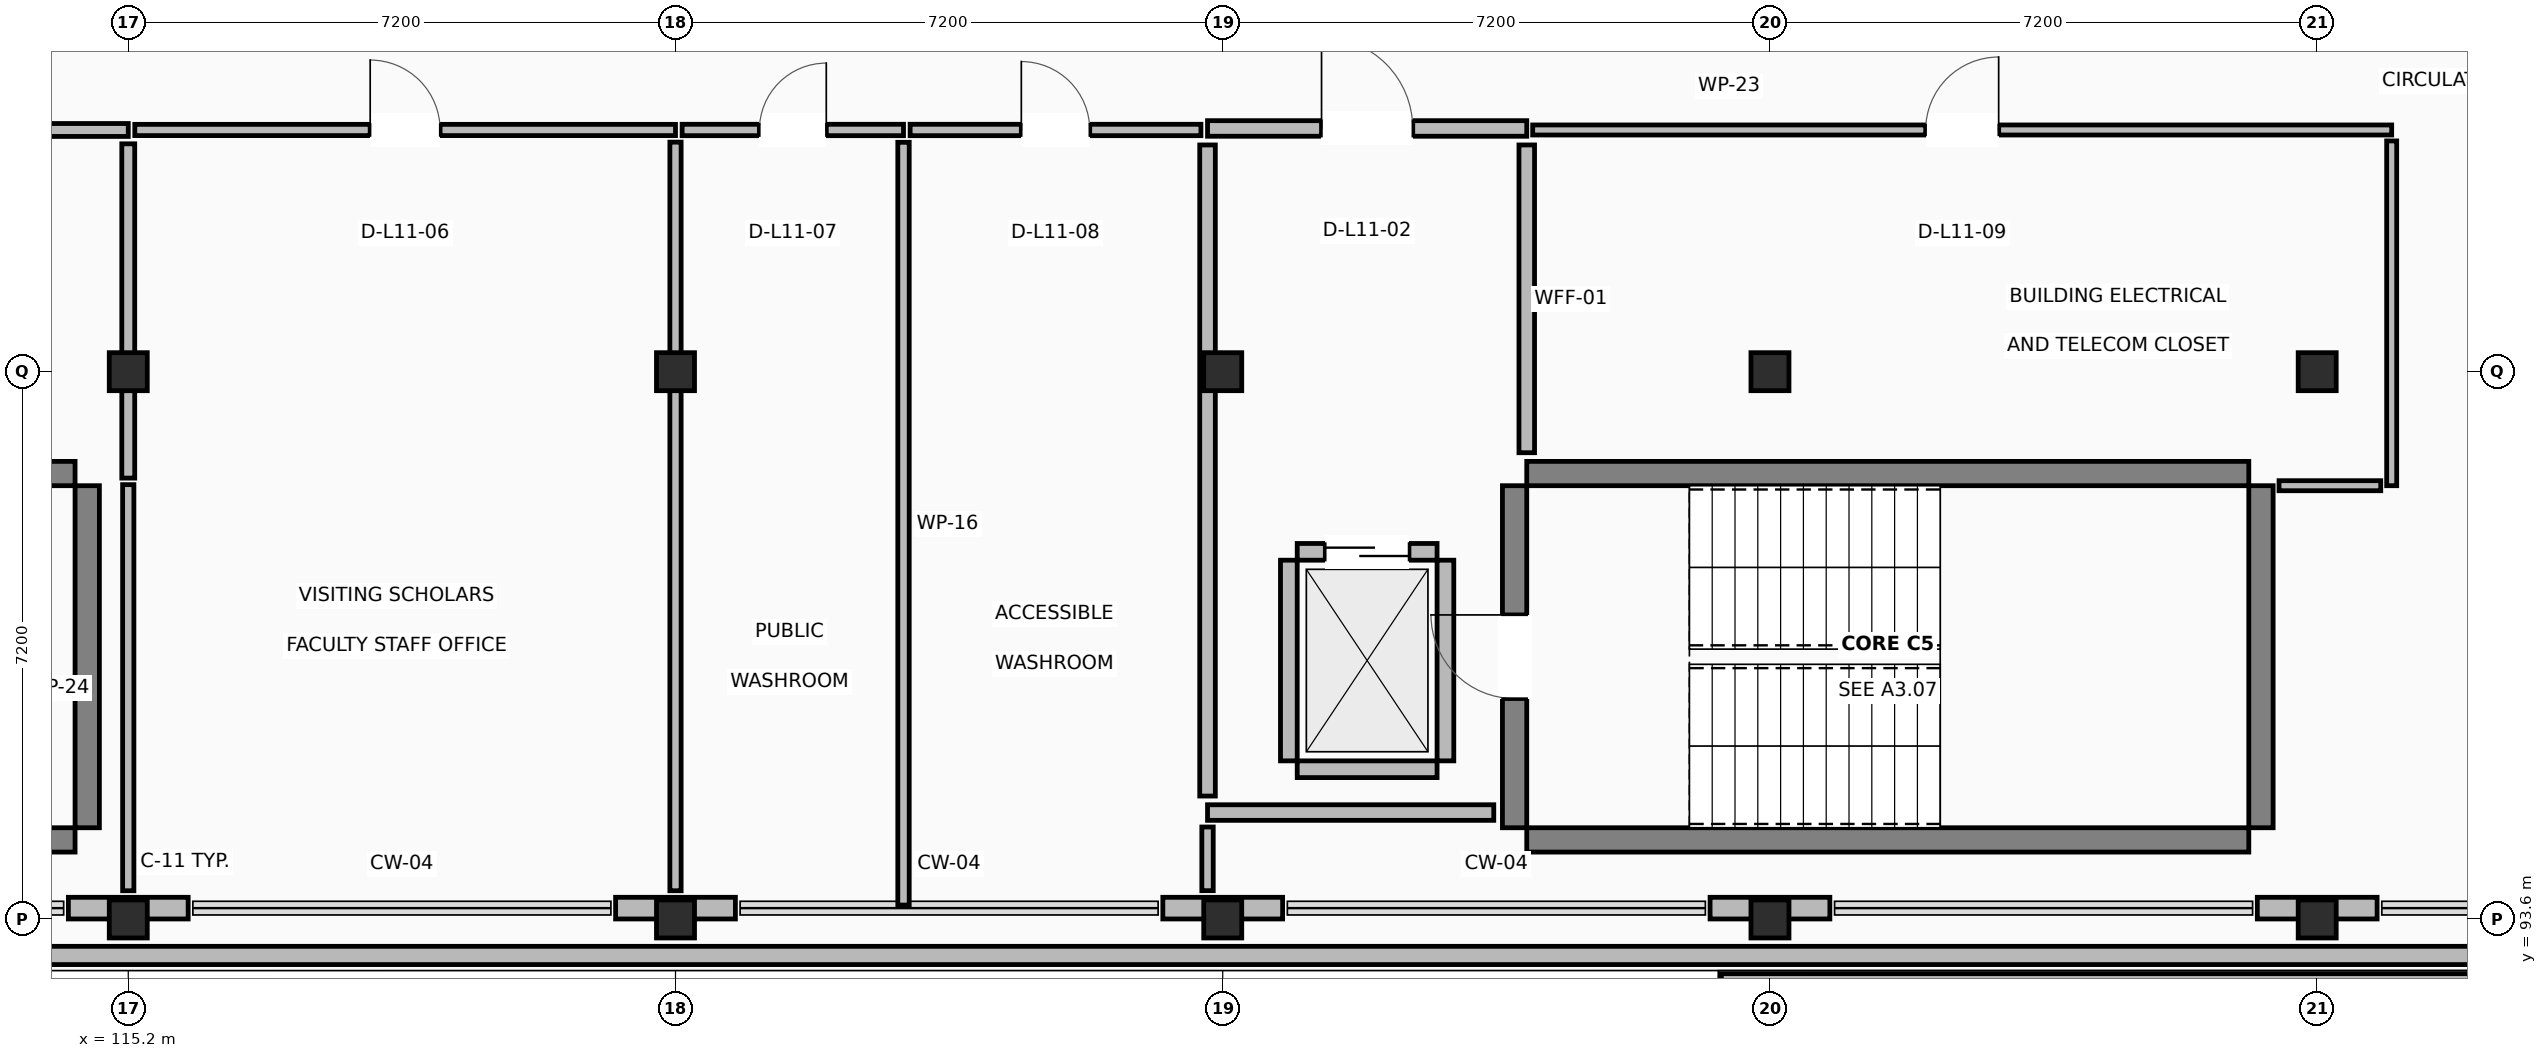
"""IFC4 building model, lengths in metres.
Left out: names, types, materials, properties, quantities, classifications, styles, units other than length and angle.
Written with IfcOpenShell. Run it as: python <this file> out.ifc"""

import sys

from ifc_helpers import new_model, si_unit, direction, frame, frame_2d, origin, origin_2d, place, context, subcontext, project, spatial, rectangle, extrude, element, fill, save


model = new_model("IFC4")
c1 = context("Model", 3, precision=1e-05, world=origin(), true_north=direction((0.0, 1.0)))
c2 = subcontext(c1, "Body", "Model", "MODEL_VIEW")
j1 = project(units=[si_unit("LENGTHUNIT", "METRE"), si_unit("PLANEANGLEUNIT", "RADIAN")], contexts=[c1])
p1 = place(None, origin())
s1 = spatial("IfcSite", under=j1, at=p1, CompositionType="ELEMENT")
p2 = place(p1, origin())
s2 = spatial("IfcBuilding", under=s1, at=p2, CompositionType="ELEMENT")
p3 = place(p2, frame((0.0, 0.0, 48.0)))
s3 = spatial("IfcBuildingStorey", under=s2, at=p3, CompositionType="ELEMENT", Elevation=48.0)
for number, where, z_axis, x_axis in (
    (1, (115.2, 93.6, 0.0), (0.0, 0.0, 1.0), (1.0, 0.0, 0.0)),
    (2, (115.2, 100.8, 0.0), (0.0, 0.0, 1.0), (1.0, 0.0, 0.0)),
    (3, (122.4, 93.6, 0.0), (0.0, 0.0, 1.0), (1.0, 0.0, 0.0)),
    (4, (122.4, 100.8, 0.0), (0.0, 0.0, 1.0), (1.0, 0.0, 0.0)),
    (5, (129.6, 93.6, 0.0), (0.0, 0.0, 1.0), (1.0, 0.0, 0.0)),
    (6, (129.6, 100.8, 0.0), (0.0, 0.0, 1.0), (1.0, 0.0, 0.0)),
    (7, (136.8, 93.6, 0.0), (0.0, 0.0, 1.0), (1.0, 0.0, 0.0)),
    (8, (136.8, 100.8, 0.0), (0.0, 0.0, 1.0), (1.0, 0.0, 0.0)),
    (9, (144.0, 93.6, 0.0), (0.0, 0.0, 1.0), (1.0, 0.0, 0.0)),
    (10, (144.0, 100.8, 0.0), (0.0, 0.0, 1.0), (1.0, 0.0, 0.0)),
):
    element("IfcColumn", number, at=place(p3, frame(where, z_axis=z_axis, x_axis=x_axis)), inside=s3, PredefinedType="COLUMN", context=c2, shape_type="SweptSolid", body=[
        extrude(rectangle(XDim=0.5, YDim=0.5, at=origin_2d()), origin(), (0.0, 0.0, 1.0), 3.92),
    ])
for number, where, z_axis, x_axis in (
    (11, (105.0, 94.64, 0.0), (0.0, 0.0, 1.0), (1.0, 0.0, 0.0)),
    (12, (105.0, 99.46, 0.0), (0.0, 0.0, 1.0), (1.0, 0.0, 0.0)),
):
    element("IfcWall", number, at=place(p3, frame(where, z_axis=z_axis, x_axis=x_axis)), inside=s3, PredefinedType="SHEAR", context=c2, shape_type="SweptSolid", body=[
        extrude(rectangle(XDim=9.5, YDim=0.32, at=frame_2d((4.75, 0.0))), origin(), (0.0, 0.0, 1.0), 3.92),
    ])
p4 = place(p3, frame((114.66, 94.8, 0.0), z_axis=(0.0, 0.0, 1.0), x_axis=(0.0, 1.0, 0.0)))
e13 = element("IfcWall", 13, at=p4, inside=s3, PredefinedType="SHEAR", context=c2, shape_type="SweptSolid", body=[
    extrude(rectangle(XDim=4.5, YDim=0.32, at=frame_2d((2.25, 0.0))), origin(), (0.0, 0.0, 1.0), 3.92),
])
for number, where, z_axis, x_axis in (
    (14, (133.6, 94.64, 0.0), (0.0, 0.0, 1.0), (1.0, 0.0, 0.0)),
    (15, (133.6, 99.46, 0.0), (0.0, 0.0, 1.0), (1.0, 0.0, 0.0)),
):
    element("IfcWall", number, at=place(p3, frame(where, z_axis=z_axis, x_axis=x_axis)), inside=s3, PredefinedType="SHEAR", context=c2, shape_type="SweptSolid", body=[
        extrude(rectangle(XDim=9.5, YDim=0.32, at=frame_2d((4.75, 0.0))), origin(), (0.0, 0.0, 1.0), 3.92),
    ])
p5 = place(p3, frame((133.44, 94.8, 0.0), z_axis=(0.0, 0.0, 1.0), x_axis=(0.0, 1.0, 0.0)))
e16 = element("IfcWall", 16, at=p5, inside=s3, PredefinedType="SHEAR", context=c2, shape_type="SweptSolid", body=[
    extrude(rectangle(XDim=4.5, YDim=0.32, at=frame_2d((2.25, 0.0))), origin(), (0.0, 0.0, 1.0), 3.92),
])
p6 = place(p5, frame((1.7, 0.0, 0.0)))
e17 = element("IfcOpeningElement", 17, at=p6, cuts=e16, PredefinedType="OPENING", context=c2, shape_type="SweptSolid", body=[
    extrude(rectangle(XDim=1.1, YDim=2.15, at=frame_2d((0.55, 1.075))), frame((0.0, 0.17, 0.0), z_axis=(0.0, -1.0, 0.0), x_axis=(1.0, 0.0, 0.0)), (0.0, 0.0, 1.0), 0.34),
])
p7 = place(p3, frame((143.26, 94.8, 0.0), z_axis=(0.0, 0.0, 1.0), x_axis=(0.0, 1.0, 0.0)))
e18 = element("IfcWall", 18, at=p7, inside=s3, PredefinedType="SHEAR", context=c2, shape_type="SweptSolid", body=[
    extrude(rectangle(XDim=4.5, YDim=0.32, at=frame_2d((2.25, 0.0))), origin(), (0.0, 0.0, 1.0), 3.92),
])
for number, where, z_axis, x_axis in (
    (19, (114.412, 93.742, 0.0), (0.0, 0.0, 1.0), (1.0, 0.0, 0.0)),
    (20, (121.612, 93.742, 0.0), (0.0, 0.0, 1.0), (1.0, 0.0, 0.0)),
    (21, (128.812, 93.742, 0.0), (0.0, 0.0, 1.0), (1.0, 0.0, 0.0)),
    (22, (136.012, 93.742, 0.0), (0.0, 0.0, 1.0), (1.0, 0.0, 0.0)),
):
    element("IfcWall", number, at=place(p3, frame(where, z_axis=z_axis, x_axis=x_axis)), inside=s3, PredefinedType="STANDARD", context=c2, shape_type="SweptSolid", body=[
        extrude(rectangle(XDim=1.576, YDim=0.285, at=frame_2d((0.788, 0.0))), origin(), (0.0, 0.0, 1.0), 2.96),
    ])
p8 = place(p3, frame((143.212, 93.742, 0.0), z_axis=(0.0, 0.0, 1.0), x_axis=(1.0, 0.0, 0.0)))
e23 = element("IfcWall", 23, at=p8, inside=s3, PredefinedType="STANDARD", context=c2, shape_type="SweptSolid", body=[
    extrude(rectangle(XDim=1.576, YDim=0.285, at=frame_2d((0.788, 0.0))), origin(), (0.0, 0.0, 1.0), 2.96),
])
p9 = place(p3, frame((151.8, 93.12, 0.0), z_axis=(0.0, 0.0, 1.0), x_axis=(-1.0, 0.0, 0.0)))
e24 = element("IfcWall", 24, at=p9, inside=s3, PredefinedType="PARAPET", context=c2, shape_type="SweptSolid", body=[
    extrude(rectangle(XDim=50.44, YDim=0.24, at=frame_2d((25.22, 0.0))), origin(), (0.0, 0.0, 1.0), 1.12),
])
p10 = place(p3, frame((136.16, 92.77, 0.0), z_axis=(0.0, 0.0, 1.0), x_axis=(1.0, 0.0, 0.0)))
e25 = element("IfcWall", 25, at=p10, inside=s3, PredefinedType="PARAPET", context=c2, shape_type="SweptSolid", body=[
    extrude(rectangle(XDim=15.68, YDim=0.22, at=frame_2d((7.84, 0.0))), origin(), (0.0, 0.0, 1.0), 1.12),
])
p11 = place(p3, frame((130.58, 95.57, 0.0), z_axis=(0.0, 0.0, 1.0), x_axis=(1.0, 0.0, 0.0)))
e26 = element("IfcWall", 26, at=p11, inside=s3, PredefinedType="STANDARD", context=c2, shape_type="SweptSolid", body=[
    extrude(rectangle(XDim=1.84, YDim=0.22, at=frame_2d((0.92, 0.0))), origin(), (0.0, 0.0, 1.0), 2.96),
])
p12 = place(p3, frame((130.58, 98.43, 0.0), z_axis=(0.0, 0.0, 1.0), x_axis=(1.0, 0.0, 0.0)))
e27 = element("IfcWall", 27, at=p12, inside=s3, PredefinedType="STANDARD", context=c2, shape_type="SweptSolid", body=[
    extrude(rectangle(XDim=1.84, YDim=0.22, at=frame_2d((0.92, 0.0))), origin(), (0.0, 0.0, 1.0), 2.96),
])
p13 = place(p12, frame((0.37, 0.0, 0.0)))
e28 = element("IfcOpeningElement", 28, at=p13, cuts=e27, PredefinedType="OPENING", context=c2, shape_type="SweptSolid", body=[
    extrude(rectangle(XDim=1.1, YDim=2.15, at=frame_2d((0.55, 1.075))), frame((0.0, 0.12, 0.0), z_axis=(0.0, -1.0, 0.0), x_axis=(1.0, 0.0, 0.0)), (0.0, 0.0, 1.0), 0.24),
])
for number, where, z_axis, x_axis in (
    (29, (130.47, 95.68, 0.0), (0.0, 0.0, 1.0), (0.0, 1.0, 0.0)),
    (30, (132.53, 95.68, 0.0), (0.0, 0.0, 1.0), (0.0, 1.0, 0.0)),
):
    element("IfcWall", number, at=place(p3, frame(where, z_axis=z_axis, x_axis=x_axis)), inside=s3, PredefinedType="STANDARD", context=c2, shape_type="SweptSolid", body=[
        extrude(rectangle(XDim=2.64, YDim=0.22, at=frame_2d((1.32, 0.0))), origin(), (0.0, 0.0, 1.0), 2.96),
    ])
p14 = place(p3, frame((129.4, 104.0, 0.0), z_axis=(0.0, 0.0, 1.0), x_axis=(1.0, 0.0, 0.0)))
e31 = element("IfcWall", 31, at=p14, inside=s3, PredefinedType="PARTITIONING", context=c2, shape_type="SweptSolid", body=[
    extrude(rectangle(XDim=4.2, YDim=0.205, at=frame_2d((2.1, 0.0))), origin(), (0.0, 0.0, 1.0), 2.96),
])
p15 = place(p14, frame((1.5, 0.0, 0.0)))
e32 = element("IfcOpeningElement", 32, at=p15, cuts=e31, PredefinedType="OPENING", context=c2, shape_type="SweptSolid", body=[
    extrude(rectangle(XDim=1.2, YDim=2.15, at=frame_2d((0.6, 1.075))), frame((0.0, 0.113, 0.0), z_axis=(0.0, -1.0, 0.0), x_axis=(1.0, 0.0, 0.0)), (0.0, 0.0, 1.0), 0.225),
])
p16 = place(p3, frame((133.6, 103.783, 0.0), z_axis=(0.0, 0.0, 1.0), x_axis=(0.0, -1.0, 0.0)))
e33 = element("IfcWall", 33, at=p16, inside=s3, PredefinedType="PARTITIONING", context=c2, shape_type="SweptSolid", body=[
    extrude(rectangle(XDim=4.049, YDim=0.205, at=frame_2d((2.024, 0.0))), origin(), (0.0, 0.0, 1.0), 2.96),
])
p17 = place(p3, frame((133.166, 95.0, 0.0), z_axis=(0.0, 0.0, 1.0), x_axis=(-1.0, 0.0, 0.0)))
e34 = element("IfcWall", 34, at=p17, inside=s3, PredefinedType="PARTITIONING", context=c2, shape_type="SweptSolid", body=[
    extrude(rectangle(XDim=3.766, YDim=0.205, at=frame_2d((1.883, 0.0))), origin(), (0.0, 0.0, 1.0), 2.96),
])
p18 = place(p3, frame((129.4, 95.217, 0.0), z_axis=(0.0, 0.0, 1.0), x_axis=(0.0, 1.0, 0.0)))
e35 = element("IfcWall", 35, at=p18, inside=s3, PredefinedType="PARTITIONING", context=c2, shape_type="SweptSolid", body=[
    extrude(rectangle(XDim=8.566, YDim=0.205, at=frame_2d((4.283, 0.0))), origin(), (0.0, 0.0, 1.0), 2.96),
])
p19 = place(p3, frame((105.097, 103.98, 0.0), z_axis=(0.0, 0.0, 1.0), x_axis=(1.0, 0.0, 0.0)))
e36 = element("IfcWall", 36, at=p19, inside=s3, PredefinedType="PARTITIONING", context=c2, shape_type="SweptSolid", body=[
    extrude(rectangle(XDim=10.103, YDim=0.17, at=frame_2d((5.052, 0.0))), origin(), (0.0, 0.0, 1.0), 2.96),
])
p20 = place(p19, frame((4.477, 0.0, 0.0)))
e37 = element("IfcOpeningElement", 37, at=p20, cuts=e36, PredefinedType="OPENING", context=c2, shape_type="SweptSolid", body=[
    extrude(rectangle(XDim=1.15, YDim=2.15, at=frame_2d((0.575, 1.075))), frame((0.0, 0.095, 0.0), z_axis=(0.0, -1.0, 0.0), x_axis=(1.0, 0.0, 0.0)), (0.0, 0.0, 1.0), 0.19),
])
p21 = place(p3, frame((115.2, 103.798, 0.0), z_axis=(0.0, 0.0, 1.0), x_axis=(0.0, -1.0, 0.0)))
e38 = element("IfcWall", 38, at=p21, inside=s3, PredefinedType="PARTITIONING", context=c2, shape_type="SweptSolid", body=[
    extrude(rectangle(XDim=4.398, YDim=0.17, at=frame_2d((2.199, 0.0))), origin(), (0.0, 0.0, 1.0), 2.96),
])
p22 = place(p3, frame((115.2, 93.971, 0.0), z_axis=(0.0, 0.0, 1.0), x_axis=(0.0, 1.0, 0.0)))
e39 = element("IfcWall", 39, at=p22, inside=s3, PredefinedType="PARTITIONING", context=c2, shape_type="SweptSolid", body=[
    extrude(rectangle(XDim=5.343, YDim=0.148, at=frame_2d((2.671, 0.0))), origin(), (0.0, 0.0, 1.0), 2.96),
])
p23 = place(p3, frame((115.286, 103.98, 0.0), z_axis=(0.0, 0.0, 1.0), x_axis=(1.0, 0.0, 0.0)))
e40 = element("IfcWall", 40, at=p23, inside=s3, PredefinedType="PARTITIONING", context=c2, shape_type="SweptSolid", body=[
    extrude(rectangle(XDim=7.114, YDim=0.148, at=frame_2d((3.557, 0.0))), origin(), (0.0, 0.0, 1.0), 2.96),
])
p24 = place(p23, frame((3.097, 0.0, 0.0)))
e41 = element("IfcOpeningElement", 41, at=p24, cuts=e40, PredefinedType="OPENING", context=c2, shape_type="SweptSolid", body=[
    extrude(rectangle(XDim=0.92, YDim=2.1, at=frame_2d((0.46, 1.05))), frame((0.0, 0.084, 0.0), z_axis=(0.0, -1.0, 0.0), x_axis=(1.0, 0.0, 0.0)), (0.0, 0.0, 1.0), 0.168),
])
p25 = place(p3, frame((122.4, 103.82, 0.0), z_axis=(0.0, 0.0, 1.0), x_axis=(0.0, -1.0, 0.0)))
e42 = element("IfcWall", 42, at=p25, inside=s3, PredefinedType="PARTITIONING", context=c2, shape_type="SweptSolid", body=[
    extrude(rectangle(XDim=9.849, YDim=0.148, at=frame_2d((4.925, 0.0))), origin(), (0.0, 0.0, 1.0), 2.96),
])
p26 = place(p3, frame((122.487, 103.98, 0.0), z_axis=(0.0, 0.0, 1.0), x_axis=(1.0, 0.0, 0.0)))
e43 = element("IfcWall", 43, at=p26, inside=s3, PredefinedType="PARTITIONING", context=c2, shape_type="SweptSolid", body=[
    extrude(rectangle(XDim=2.913, YDim=0.15, at=frame_2d((1.457, 0.0))), origin(), (0.0, 0.0, 1.0), 2.96),
])
p27 = place(p26, frame((1.017, 0.0, 0.0)))
e44 = element("IfcOpeningElement", 44, at=p27, cuts=e43, PredefinedType="OPENING", context=c2, shape_type="SweptSolid", body=[
    extrude(rectangle(XDim=0.88, YDim=2.1, at=frame_2d((0.44, 1.05))), frame((0.0, 0.085, 0.0), z_axis=(0.0, -1.0, 0.0), x_axis=(1.0, 0.0, 0.0)), (0.0, 0.0, 1.0), 0.17),
])
p28 = place(p3, frame((125.4, 103.818, 0.0), z_axis=(0.0, 0.0, 1.0), x_axis=(0.0, -1.0, 0.0)))
e45 = element("IfcWall", 45, at=p28, inside=s3, PredefinedType="PARTITIONING", context=c2, shape_type="SweptSolid", body=[
    extrude(rectangle(XDim=10.035, YDim=0.15, at=frame_2d((5.018, 0.0))), origin(), (0.0, 0.0, 1.0), 2.96),
])
p29 = place(p3, frame((125.487, 103.98, 0.0), z_axis=(0.0, 0.0, 1.0), x_axis=(1.0, 0.0, 0.0)))
e46 = element("IfcWall", 46, at=p29, inside=s3, PredefinedType="PARTITIONING", context=c2, shape_type="SweptSolid", body=[
    extrude(rectangle(XDim=3.826, YDim=0.15, at=frame_2d((1.913, 0.0))), origin(), (0.0, 0.0, 1.0), 2.96),
])
p30 = place(p29, frame((1.463, 0.0, 0.0)))
e47 = element("IfcOpeningElement", 47, at=p30, cuts=e46, PredefinedType="OPENING", context=c2, shape_type="SweptSolid", body=[
    extrude(rectangle(XDim=0.9, YDim=2.1, at=frame_2d((0.45, 1.05))), frame((0.0, 0.085, 0.0), z_axis=(0.0, -1.0, 0.0), x_axis=(1.0, 0.0, 0.0)), (0.0, 0.0, 1.0), 0.17),
])
p31 = place(p3, frame((129.4, 94.81, 0.0), z_axis=(0.0, 0.0, 1.0), x_axis=(0.0, -1.0, 0.0)))
e48 = element("IfcWall", 48, at=p31, inside=s3, PredefinedType="PARTITIONING", context=c2, shape_type="SweptSolid", body=[
    extrude(rectangle(XDim=0.838, YDim=0.15, at=frame_2d((0.419, 0.0))), origin(), (0.0, 0.0, 1.0), 2.96),
])
p32 = place(p3, frame((133.678, 103.98, 0.0), z_axis=(0.0, 0.0, 1.0), x_axis=(1.0, 0.0, 0.0)))
e49 = element("IfcWall", 49, at=p32, inside=s3, PredefinedType="PARTITIONING", context=c2, shape_type="SweptSolid", body=[
    extrude(rectangle(XDim=11.302, YDim=0.132, at=frame_2d((5.651, 0.0))), origin(), (0.0, 0.0, 1.0), 2.96),
])
p33 = place(p32, frame((5.171, 0.0, 0.0)))
e50 = element("IfcOpeningElement", 50, at=p33, cuts=e49, PredefinedType="OPENING", context=c2, shape_type="SweptSolid", body=[
    extrude(rectangle(XDim=0.96, YDim=2.1, at=frame_2d((0.48, 1.05))), frame((0.0, 0.076, 0.0), z_axis=(0.0, -1.0, 0.0), x_axis=(1.0, 0.0, 0.0)), (0.0, 0.0, 1.0), 0.152),
])
p34 = place(p3, frame((144.98, 103.836, 0.0), z_axis=(0.0, 0.0, 1.0), x_axis=(0.0, -1.0, 0.0)))
e51 = element("IfcWall", 51, at=p34, inside=s3, PredefinedType="PARTITIONING", context=c2, shape_type="SweptSolid", body=[
    extrude(rectangle(XDim=4.536, YDim=0.132, at=frame_2d((2.268, 0.0))), origin(), (0.0, 0.0, 1.0), 2.96),
])
p35 = place(p3, frame((144.836, 99.3, 0.0), z_axis=(0.0, 0.0, 1.0), x_axis=(-1.0, 0.0, 0.0)))
e52 = element("IfcWall", 52, at=p35, inside=s3, PredefinedType="PARTITIONING", context=c2, shape_type="SweptSolid", body=[
    extrude(rectangle(XDim=1.338, YDim=0.132, at=frame_2d((0.669, 0.0))), origin(), (0.0, 0.0, 1.0), 2.96),
])
p36 = place(p6, origin())
e53 = element("IfcDoor", 53, at=p36, inside=s3, OperationType="SINGLE_SWING_RIGHT", PredefinedType="DOOR", context=c2, shape_type="SweptSolid", body=[
    extrude(rectangle(XDim=1.1, YDim=2.15, at=frame_2d((0.55, 1.075))), frame((0.0, 0.025, 0.0), z_axis=(0.0, -1.0, 0.0), x_axis=(1.0, 0.0, 0.0)), (0.0, 0.0, 1.0), 0.05),
])
fill(e17, e53)
p37 = place(p13, origin())
e54 = element("IfcDoor", 54, at=p37, inside=s3, OperationType="SLIDING_TO_RIGHT", PredefinedType="DOOR", context=c2, shape_type="SweptSolid", body=[
    extrude(rectangle(XDim=1.1, YDim=2.15, at=frame_2d((0.55, 1.075))), frame((0.0, 0.025, 0.0), z_axis=(0.0, -1.0, 0.0), x_axis=(1.0, 0.0, 0.0)), (0.0, 0.0, 1.0), 0.05),
])
fill(e28, e54)
p38 = place(p15, origin())
e55 = element("IfcDoor", 55, at=p38, inside=s3, OperationType="SINGLE_SWING_LEFT", PredefinedType="DOOR", context=c2, shape_type="SweptSolid", body=[
    extrude(rectangle(XDim=1.2, YDim=2.15, at=frame_2d((0.6, 1.075))), frame((0.0, 0.025, 0.0), z_axis=(0.0, -1.0, 0.0), x_axis=(1.0, 0.0, 0.0)), (0.0, 0.0, 1.0), 0.05),
])
fill(e32, e55)
p39 = place(p24, origin())
e56 = element("IfcDoor", 56, at=p39, inside=s3, OperationType="SINGLE_SWING_LEFT", PredefinedType="DOOR", context=c2, shape_type="SweptSolid", body=[
    extrude(rectangle(XDim=0.92, YDim=2.1, at=frame_2d((0.46, 1.05))), frame((0.0, 0.025, 0.0), z_axis=(0.0, -1.0, 0.0), x_axis=(1.0, 0.0, 0.0)), (0.0, 0.0, 1.0), 0.05),
])
fill(e41, e56)
p40 = place(p27, origin())
e57 = element("IfcDoor", 57, at=p40, inside=s3, OperationType="SINGLE_SWING_RIGHT", PredefinedType="DOOR", context=c2, shape_type="SweptSolid", body=[
    extrude(rectangle(XDim=0.88, YDim=2.1, at=frame_2d((0.44, 1.05))), frame((0.0, 0.025, 0.0), z_axis=(0.0, -1.0, 0.0), x_axis=(1.0, 0.0, 0.0)), (0.0, 0.0, 1.0), 0.05),
])
fill(e44, e57)
p41 = place(p30, origin())
e58 = element("IfcDoor", 58, at=p41, inside=s3, OperationType="SINGLE_SWING_LEFT", PredefinedType="DOOR", context=c2, shape_type="SweptSolid", body=[
    extrude(rectangle(XDim=0.9, YDim=2.1, at=frame_2d((0.45, 1.05))), frame((0.0, 0.025, 0.0), z_axis=(0.0, -1.0, 0.0), x_axis=(1.0, 0.0, 0.0)), (0.0, 0.0, 1.0), 0.05),
])
fill(e47, e58)
p42 = place(p33, origin())
e59 = element("IfcDoor", 59, at=p42, inside=s3, OperationType="SINGLE_SWING_RIGHT", PredefinedType="DOOR", context=c2, shape_type="SweptSolid", body=[
    extrude(rectangle(XDim=0.96, YDim=2.1, at=frame_2d((0.48, 1.05))), frame((0.0, 0.025, 0.0), z_axis=(0.0, -1.0, 0.0), x_axis=(1.0, 0.0, 0.0)), (0.0, 0.0, 1.0), 0.05),
])
fill(e50, e59)
save(model, sys.argv[1])
